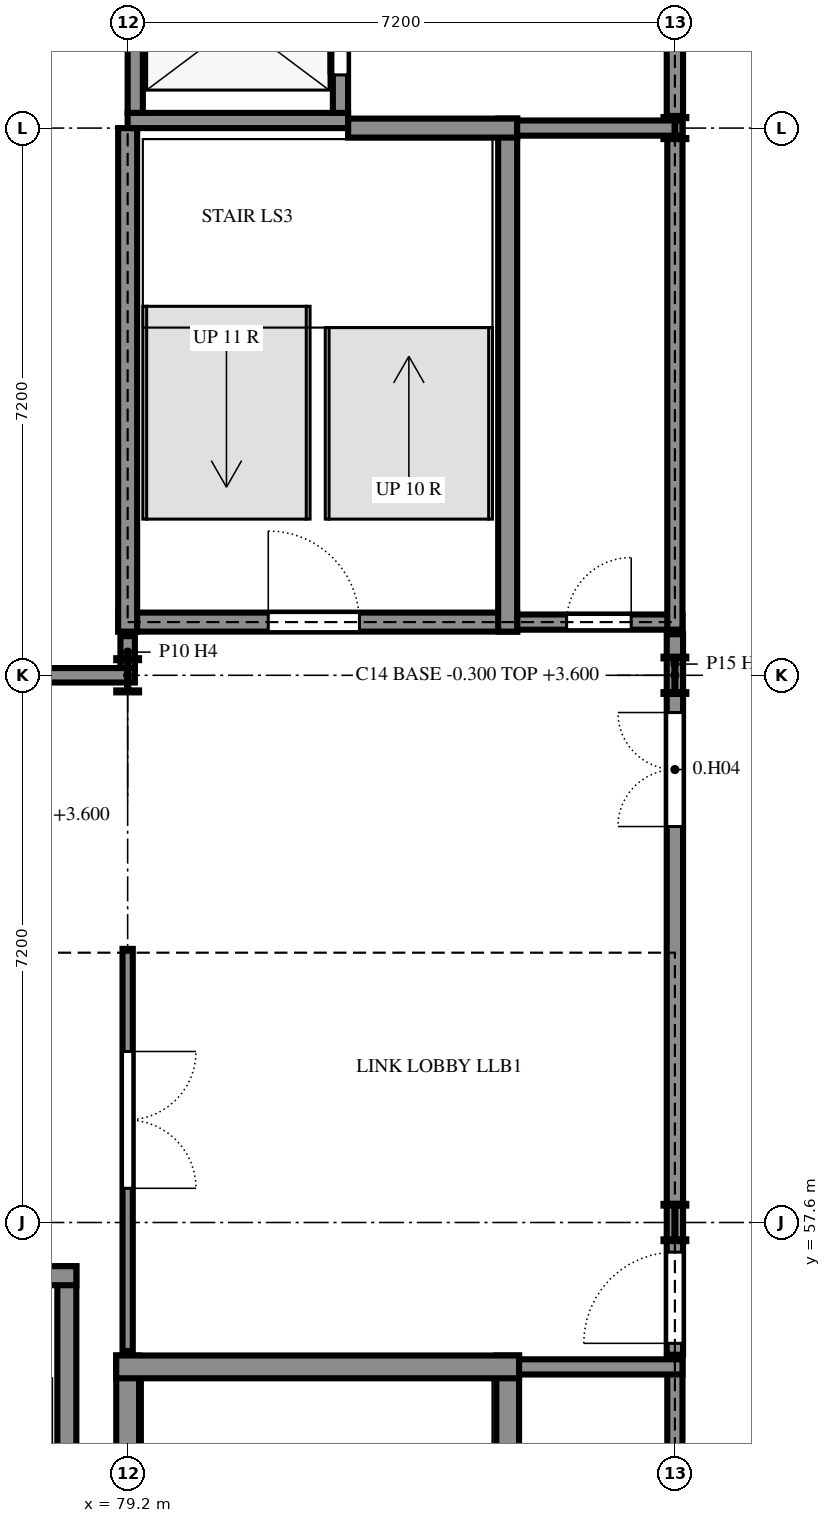
"""IFC4 building model, lengths in metres.
Left out: names, types, materials, properties, quantities, classifications, styles, units other than length and angle.
Written with IfcOpenShell. Run it as: python <this file> out.ifc"""

import sys

from ifc_helpers import new_model, si_unit, direction, frame, frame_2d, origin, origin_2d, place, context, subcontext, project, spatial, rectangle, i_section, extrude, element, fill, save


model = new_model("IFC4")
c1 = context("Model", 3, precision=1e-05, world=origin(), true_north=direction((0.0, 1.0)))
c2 = subcontext(c1, "Body", "Model", "MODEL_VIEW")
j1 = project(units=[si_unit("LENGTHUNIT", "METRE"), si_unit("PLANEANGLEUNIT", "RADIAN")], contexts=[c1])
p1 = place(None, origin())
s1 = spatial("IfcSite", under=j1, at=p1, CompositionType="ELEMENT")
p2 = place(p1, origin())
s2 = spatial("IfcBuilding", under=s1, at=p2, CompositionType="ELEMENT")
p3 = place(p2, origin())
s3 = spatial("IfcBuildingStorey", under=s2, at=p3, CompositionType="ELEMENT", Elevation=0.0)
p4 = place(p3, frame((79.2, 64.8, -0.3), z_axis=(0.0, 0.0, 1.0), x_axis=(1.0, 0.0, 0.0)))
e1 = element("IfcColumn", 1, at=p4, inside=s3, PredefinedType="COLUMN", context=c2, shape_type="SweptSolid", body=[
    extrude(i_section(OverallWidth=0.3, OverallDepth=0.45, WebThickness=0.014, FlangeThickness=0.026, FilletRadius=0.027, at=origin_2d()), origin(), (0.0, 0.0, 1.0), 3.9),
])
for number, where, z_axis, x_axis in (
    (2, (86.4, 57.6, -0.3), (0.0, 0.0, 1.0), (1.0, 0.0, 0.0)),
    (3, (86.4, 64.8, -0.3), (0.0, 0.0, 1.0), (1.0, 0.0, 0.0)),
):
    element("IfcColumn", number, at=place(p3, frame(where, z_axis=z_axis, x_axis=x_axis)), inside=s3, PredefinedType="COLUMN", context=c2, shape_type="SweptSolid", body=[
        extrude(i_section(OverallWidth=0.3, OverallDepth=0.49, WebThickness=0.012, FlangeThickness=0.023, FilletRadius=0.027, at=origin_2d()), origin(), (0.0, 0.0, 1.0), 3.9),
    ])
p5 = place(p3, frame((86.4, 72.0, -0.3), z_axis=(0.0, 0.0, 1.0), x_axis=(1.0, 0.0, 0.0)))
e4 = element("IfcColumn", 4, at=p5, inside=s3, PredefinedType="COLUMN", context=c2, shape_type="SweptSolid", body=[
    extrude(i_section(OverallWidth=0.3, OverallDepth=0.29, WebThickness=0.009, FlangeThickness=0.014, FilletRadius=0.027, at=origin_2d()), origin(), (0.0, 0.0, 1.0), 3.9),
])
p6 = place(p3, frame((84.2, 49.05, 0.0), z_axis=(0.0, 0.0, 1.0), x_axis=(0.0, 1.0, 0.0)))
e5 = element("IfcWall", 5, at=p6, inside=s3, PredefinedType="SHEAR", context=c2, shape_type="SweptSolid", body=[
    extrude(rectangle(XDim=6.8, YDim=0.3, at=frame_2d((3.4, 0.0))), origin(), (0.0, 0.0, 1.0), 3.6),
])
p7 = place(p3, frame((86.4, 49.1, 0.0), z_axis=(0.0, 0.0, 1.0), x_axis=(0.0, 1.0, 0.0)))
e6 = element("IfcWall", 6, at=p7, inside=s3, PredefinedType="SHEAR", context=c2, shape_type="SweptSolid", body=[
    extrude(rectangle(XDim=6.7, YDim=0.2, at=frame_2d((3.35, 0.0))), origin(), (0.0, 0.0, 1.0), 3.6),
])
p8 = place(p3, frame((78.4, 50.275, 0.0), z_axis=(0.0, 0.0, 1.0), x_axis=(0.0, 1.0, 0.0)))
e7 = element("IfcWall", 7, at=p8, inside=s3, PredefinedType="SHEAR", context=c2, shape_type="SweptSolid", body=[
    extrude(rectangle(XDim=6.75, YDim=0.25, at=frame_2d((3.375, 0.0))), origin(), (0.0, 0.0, 1.0), 3.6),
])
p9 = place(p3, frame((79.2, 55.85, 0.0), z_axis=(0.0, 0.0, 1.0), x_axis=(0.0, -1.0, 0.0)))
e8 = element("IfcWall", 8, at=p9, inside=s3, PredefinedType="SHEAR", context=c2, shape_type="SweptSolid", body=[
    extrude(rectangle(XDim=5.325, YDim=0.3, at=frame_2d((2.663, 0.0))), origin(), (0.0, 0.0, 1.0), 3.6),
])
p10 = place(p3, frame((84.35, 55.7, 0.0), z_axis=(0.0, 0.0, 1.0), x_axis=(-1.0, 0.0, 0.0)))
e9 = element("IfcWall", 9, at=p10, inside=s3, PredefinedType="SHEAR", context=c2, shape_type="SweptSolid", body=[
    extrude(rectangle(XDim=5.3, YDim=0.3, at=frame_2d((2.65, 0.0))), origin(), (0.0, 0.0, 1.0), 3.6),
])
p11 = place(p3, frame((86.5, 55.7, 0.0), z_axis=(0.0, 0.0, 1.0), x_axis=(-1.0, 0.0, 0.0)))
e10 = element("IfcWall", 10, at=p11, inside=s3, PredefinedType="SHEAR", context=c2, shape_type="SweptSolid", body=[
    extrude(rectangle(XDim=2.15, YDim=0.2, at=frame_2d((1.075, 0.0))), origin(), (0.0, 0.0, 1.0), 3.6),
])
p12 = place(p3, frame((78.525, 56.9, 0.0), z_axis=(0.0, 0.0, 1.0), x_axis=(-1.0, 0.0, 0.0)))
e11 = element("IfcWall", 11, at=p12, inside=s3, PredefinedType="SHEAR", context=c2, shape_type="SweptSolid", body=[
    extrude(rectangle(XDim=5.0, YDim=0.25, at=frame_2d((2.5, 0.0))), origin(), (0.0, 0.0, 1.0), 3.6),
])
p13 = place(p12, frame((1.975, 0.0, 0.0)))
e12 = element("IfcOpeningElement", 12, at=p13, cuts=e11, PredefinedType="OPENING", context=c2, shape_type="SweptSolid", body=[
    extrude(rectangle(XDim=1.2, YDim=2.4, at=frame_2d((0.6, 1.2))), frame((0.0, 0.135, 0.0), z_axis=(0.0, -1.0, 0.0), x_axis=(1.0, 0.0, 0.0)), (0.0, 0.0, 1.0), 0.27),
])
p14 = place(p3, frame((79.075, 65.5, 0.0), z_axis=(0.0, 0.0, 1.0), x_axis=(1.0, 0.0, 0.0)))
e13 = element("IfcWall", 13, at=p14, inside=s3, PredefinedType="SHEAR", context=c2, shape_type="SweptSolid", body=[
    extrude(rectangle(XDim=5.25, YDim=0.25, at=frame_2d((2.625, 0.0))), origin(), (0.0, 0.0, 1.0), 3.6),
])
p15 = place(p14, frame((1.975, 0.0, 0.0)))
e14 = element("IfcOpeningElement", 14, at=p15, cuts=e13, PredefinedType="OPENING", context=c2, shape_type="SweptSolid", body=[
    extrude(rectangle(XDim=1.2, YDim=2.4, at=frame_2d((0.6, 1.2))), frame((0.0, 0.135, 0.0), z_axis=(0.0, -1.0, 0.0), x_axis=(1.0, 0.0, 0.0)), (0.0, 0.0, 1.0), 0.27),
])
p16 = place(p3, frame((84.325, 65.5, 0.0), z_axis=(0.0, 0.0, 1.0), x_axis=(1.0, 0.0, 0.0)))
e15 = element("IfcWall", 15, at=p16, inside=s3, PredefinedType="SHEAR", context=c2, shape_type="SweptSolid", body=[
    extrude(rectangle(XDim=2.175, YDim=0.2, at=frame_2d((1.087, 0.0))), origin(), (0.0, 0.0, 1.0), 3.6),
])
p17 = place(p16, frame((0.65, 0.0, 0.0)))
e16 = element("IfcOpeningElement", 16, at=p17, cuts=e15, PredefinedType="OPENING", context=c2, shape_type="SweptSolid", body=[
    extrude(rectangle(XDim=0.85, YDim=2.1, at=frame_2d((0.425, 1.05))), frame((0.0, 0.11, 0.0), z_axis=(0.0, -1.0, 0.0), x_axis=(1.0, 0.0, 0.0)), (0.0, 0.0, 1.0), 0.22),
])
p18 = place(p3, frame((84.2, 65.375, 0.0), z_axis=(0.0, 0.0, 1.0), x_axis=(0.0, 1.0, 0.0)))
e17 = element("IfcWall", 17, at=p18, inside=s3, PredefinedType="SHEAR", context=c2, shape_type="SweptSolid", body=[
    extrude(rectangle(XDim=6.75, YDim=0.25, at=frame_2d((3.375, 0.0))), origin(), (0.0, 0.0, 1.0), 3.6),
])
p19 = place(p3, frame((86.4, 65.4, 0.0), z_axis=(0.0, 0.0, 1.0), x_axis=(0.0, 1.0, 0.0)))
e18 = element("IfcWall", 18, at=p19, inside=s3, PredefinedType="SHEAR", context=c2, shape_type="SweptSolid", body=[
    extrude(rectangle(XDim=6.7, YDim=0.2, at=frame_2d((3.35, 0.0))), origin(), (0.0, 0.0, 1.0), 3.6),
])
p20 = place(p3, frame((79.2, 72.0, 0.0), z_axis=(0.0, 0.0, 1.0), x_axis=(0.0, -1.0, 0.0)))
e19 = element("IfcWall", 19, at=p20, inside=s3, PredefinedType="SHEAR", context=c2, shape_type="SweptSolid", body=[
    extrude(rectangle(XDim=6.625, YDim=0.25, at=frame_2d((3.312, 0.0))), origin(), (0.0, 0.0, 1.0), 3.6),
])
p21 = place(p3, frame((82.1, 72.0, 0.0), z_axis=(0.0, 0.0, 1.0), x_axis=(1.0, 0.0, 0.0)))
e20 = element("IfcWall", 20, at=p21, inside=s3, PredefinedType="SHEAR", context=c2, shape_type="SweptSolid", body=[
    extrude(rectangle(XDim=2.225, YDim=0.25, at=frame_2d((1.112, 0.0))), origin(), (0.0, 0.0, 1.0), 3.6),
])
p22 = place(p3, frame((86.5, 72.0, 0.0), z_axis=(0.0, 0.0, 1.0), x_axis=(-1.0, 0.0, 0.0)))
e21 = element("IfcWall", 21, at=p22, inside=s3, PredefinedType="SHEAR", context=c2, shape_type="SweptSolid", body=[
    extrude(rectangle(XDim=2.175, YDim=0.2, at=frame_2d((1.087, 0.0))), origin(), (0.0, 0.0, 1.0), 3.6),
])
p23 = place(p3, frame((79.2, 72.1, -1.4), z_axis=(0.0, 0.0, 1.0), x_axis=(1.0, 0.0, 0.0)))
e22 = element("IfcWall", 22, at=p23, inside=s3, PredefinedType="SHEAR", context=c2, shape_type="SweptSolid", body=[
    extrude(rectangle(XDim=2.9, YDim=0.2, at=frame_2d((1.45, 0.0))), origin(), (0.0, 0.0, 1.0), 5.0),
])
p24 = place(p3, frame((79.3, 72.2, -1.4), z_axis=(0.0, 0.0, 1.0), x_axis=(0.0, 1.0, 0.0)))
e23 = element("IfcWall", 23, at=p24, inside=s3, PredefinedType="SHEAR", context=c2, shape_type="SweptSolid", body=[
    extrude(rectangle(XDim=2.4, YDim=0.2, at=frame_2d((1.2, 0.0))), origin(), (0.0, 0.0, 1.0), 5.0),
])
p25 = place(p3, frame((82.0, 72.2, -1.4), z_axis=(0.0, 0.0, 1.0), x_axis=(0.0, 1.0, 0.0)))
e24 = element("IfcWall", 24, at=p25, inside=s3, PredefinedType="SHEAR", context=c2, shape_type="SweptSolid", body=[
    extrude(rectangle(XDim=2.4, YDim=0.2, at=frame_2d((1.2, 0.0))), origin(), (0.0, 0.0, 1.0), 5.0),
])
p26 = place(p25, frame((0.5, 0.0, 1.4)))
e25 = element("IfcOpeningElement", 25, at=p26, cuts=e24, PredefinedType="OPENING", context=c2, shape_type="SweptSolid", body=[
    extrude(rectangle(XDim=1.4, YDim=2.1, at=frame_2d((0.7, 1.05))), frame((0.0, 0.11, 0.0), z_axis=(0.0, -1.0, 0.0), x_axis=(1.0, 0.0, 0.0)), (0.0, 0.0, 1.0), 0.22),
])
p27 = place(p3, frame((79.2, 61.2, 0.0), z_axis=(0.0, 0.0, 1.0), x_axis=(0.0, -1.0, 0.0)))
e26 = element("IfcWall", 26, at=p27, inside=s3, PredefinedType="PARTITIONING", context=c2, shape_type="SweptSolid", body=[
    extrude(rectangle(XDim=5.29, YDim=0.135, at=frame_2d((2.645, 0.0))), origin(), (0.0, 0.0, 1.0), 3.01),
])
p28 = place(p27, frame((1.35, 0.0, 0.0)))
e27 = element("IfcOpeningElement", 27, at=p28, cuts=e26, PredefinedType="OPENING", context=c2, shape_type="SweptSolid", body=[
    extrude(rectangle(XDim=1.8, YDim=2.4, at=frame_2d((0.9, 1.2))), frame((0.0, 0.077, 0.0), z_axis=(0.0, -1.0, 0.0), x_axis=(1.0, 0.0, 0.0)), (0.0, 0.0, 1.0), 0.155),
])
p29 = place(p3, frame((79.2, 65.315, 0.0), z_axis=(0.0, 0.0, 1.0), x_axis=(0.0, -1.0, 0.0)))
e28 = element("IfcWall", 28, at=p29, inside=s3, PredefinedType="PARTITIONING", context=c2, shape_type="SweptSolid", body=[
    extrude(rectangle(XDim=0.42, YDim=0.19, at=frame_2d((0.21, 0.0))), origin(), (0.0, 0.0, 1.0), 3.42),
])
p30 = place(p3, frame((86.4, 55.86, 0.0), z_axis=(0.0, 0.0, 1.0), x_axis=(0.0, 1.0, 0.0)))
e29 = element("IfcWall", 29, at=p30, inside=s3, PredefinedType="PARTITIONING", context=c2, shape_type="SweptSolid", body=[
    extrude(rectangle(XDim=1.985, YDim=0.215, at=frame_2d((0.992, 0.0))), origin(), (0.0, 0.0, 1.0), 3.6),
])
p31 = place(p30, frame((0.15, 0.0, 0.0)))
e30 = element("IfcOpeningElement", 30, at=p31, cuts=e29, PredefinedType="OPENING", context=c2, shape_type="SweptSolid", body=[
    extrude(rectangle(XDim=1.2, YDim=2.4, at=frame_2d((0.6, 1.2))), frame((0.0, 0.117, 0.0), z_axis=(0.0, -1.0, 0.0), x_axis=(1.0, 0.0, 0.0)), (0.0, 0.0, 1.0), 0.235),
])
p32 = place(p3, frame((86.4, 80.4, 0.0), z_axis=(0.0, 0.0, 1.0), x_axis=(0.0, -1.0, 0.0)))
e31 = element("IfcWall", 31, at=p32, inside=s3, PredefinedType="PARTITIONING", context=c2, shape_type="SweptSolid", body=[
    extrude(rectangle(XDim=8.24, YDim=0.215, at=frame_2d((4.12, 0.0))), origin(), (0.0, 0.0, 1.0), 3.12),
])
p33 = place(p3, frame((79.295, 64.8, 0.0), z_axis=(0.0, 0.0, 1.0), x_axis=(-1.0, 0.0, 0.0)))
e32 = element("IfcWall", 32, at=p33, inside=s3, PredefinedType="PARTITIONING", context=c2, shape_type="SweptSolid", body=[
    extrude(rectangle(XDim=7.99, YDim=0.19, at=frame_2d((3.995, 0.0))), origin(), (0.0, 0.0, 1.0), 2.81),
])
p34 = place(p3, frame((86.4, 57.845, 0.0), z_axis=(0.0, 0.0, 1.0), x_axis=(0.0, 1.0, 0.0)))
e33 = element("IfcWall", 33, at=p34, inside=s3, PredefinedType="PARTITIONING", context=c2, shape_type="SweptSolid", body=[
    extrude(rectangle(XDim=6.71, YDim=0.215, at=frame_2d((3.355, 0.0))), origin(), (0.0, 0.0, 1.0), 3.12),
])
p35 = place(p34, frame((4.965, 0.0, 0.0)))
e34 = element("IfcOpeningElement", 34, at=p35, cuts=e33, PredefinedType="OPENING", context=c2, shape_type="SweptSolid", body=[
    extrude(rectangle(XDim=1.5, YDim=2.1, at=frame_2d((0.75, 1.05))), frame((0.0, 0.117, 0.0), z_axis=(0.0, -1.0, 0.0), x_axis=(1.0, 0.0, 0.0)), (0.0, 0.0, 1.0), 0.235),
])
p36 = place(p3, frame((86.4, 64.555, 0.0), z_axis=(0.0, 0.0, 1.0), x_axis=(0.0, 1.0, 0.0)))
e35 = element("IfcWall", 35, at=p36, inside=s3, PredefinedType="PARTITIONING", context=c2, shape_type="SweptSolid", body=[
    extrude(rectangle(XDim=0.785, YDim=0.215, at=frame_2d((0.393, 0.0))), origin(), (0.0, 0.0, 1.0), 3.6),
])
p37 = place(p26, origin())
e36 = element("IfcDoor", 36, at=p37, inside=s3, OperationType="SLIDING_TO_LEFT", PredefinedType="DOOR", context=c2, shape_type="SweptSolid", body=[
    extrude(rectangle(XDim=1.4, YDim=2.1, at=frame_2d((0.7, 1.05))), frame((0.0, 0.025, 0.0), z_axis=(0.0, -1.0, 0.0), x_axis=(1.0, 0.0, 0.0)), (0.0, 0.0, 1.0), 0.05),
])
fill(e25, e36)
p38 = place(p15, origin())
e37 = element("IfcDoor", 37, at=p38, inside=s3, OperationType="SINGLE_SWING_RIGHT", PredefinedType="DOOR", context=c2, shape_type="SweptSolid", body=[
    extrude(rectangle(XDim=1.2, YDim=2.4, at=frame_2d((0.6, 1.2))), frame((0.0, 0.025, 0.0), z_axis=(0.0, -1.0, 0.0), x_axis=(1.0, 0.0, 0.0)), (0.0, 0.0, 1.0), 0.05),
])
fill(e14, e37)
p39 = place(p17, origin())
e38 = element("IfcDoor", 38, at=p39, inside=s3, OperationType="SINGLE_SWING_LEFT", PredefinedType="DOOR", context=c2, shape_type="SweptSolid", body=[
    extrude(rectangle(XDim=0.85, YDim=2.1, at=frame_2d((0.425, 1.05))), frame((0.0, 0.025, 0.0), z_axis=(0.0, -1.0, 0.0), x_axis=(1.0, 0.0, 0.0)), (0.0, 0.0, 1.0), 0.05),
])
fill(e16, e38)
p40 = place(p35, origin())
e39 = element("IfcDoor", 39, at=p40, inside=s3, OperationType="DOUBLE_DOOR_SINGLE_SWING", PredefinedType="DOOR", context=c2, shape_type="SweptSolid", body=[
    extrude(rectangle(XDim=1.5, YDim=2.1, at=frame_2d((0.75, 1.05))), frame((0.0, 0.025, 0.0), z_axis=(0.0, -1.0, 0.0), x_axis=(1.0, 0.0, 0.0)), (0.0, 0.0, 1.0), 0.05),
])
fill(e34, e39)
p41 = place(p31, origin())
e40 = element("IfcDoor", 40, at=p41, inside=s3, OperationType="SINGLE_SWING_RIGHT", PredefinedType="DOOR", context=c2, shape_type="SweptSolid", body=[
    extrude(rectangle(XDim=1.2, YDim=2.4, at=frame_2d((0.6, 1.2))), frame((0.0, 0.025, 0.0), z_axis=(0.0, -1.0, 0.0), x_axis=(1.0, 0.0, 0.0)), (0.0, 0.0, 1.0), 0.05),
])
fill(e30, e40)
p42 = place(p28, origin())
e41 = element("IfcDoor", 41, at=p42, inside=s3, OperationType="DOUBLE_DOOR_SINGLE_SWING", PredefinedType="DOOR", context=c2, shape_type="SweptSolid", body=[
    extrude(rectangle(XDim=1.8, YDim=2.4, at=frame_2d((0.9, 1.2))), frame((0.0, 0.025, 0.0), z_axis=(0.0, -1.0, 0.0), x_axis=(1.0, 0.0, 0.0)), (0.0, 0.0, 1.0), 0.05),
])
fill(e27, e41)
save(model, sys.argv[1])
